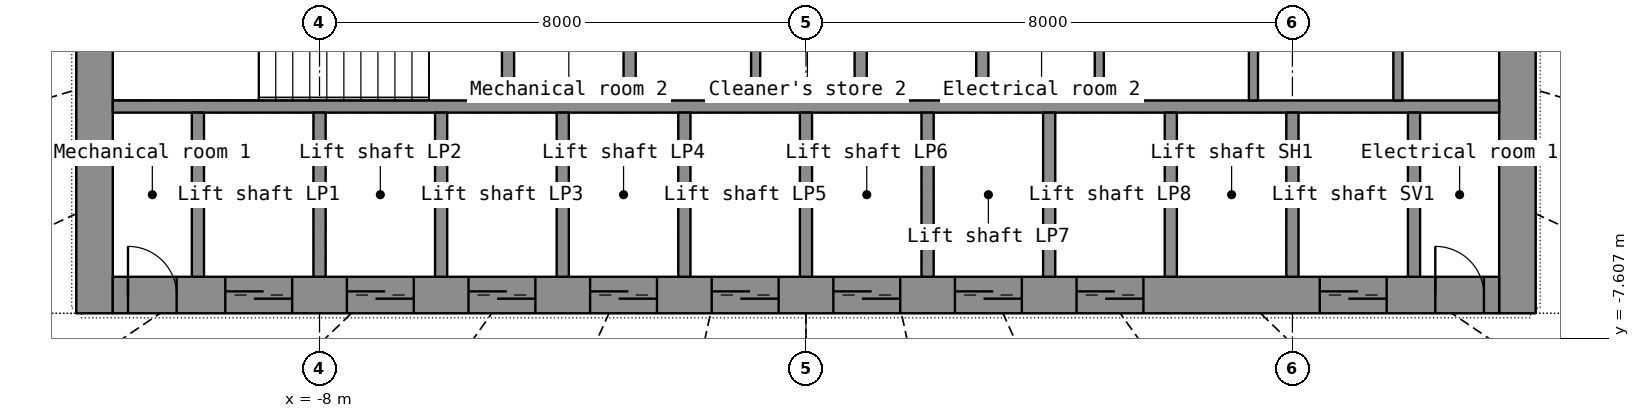
"""IFC4 building model, lengths in metres.
Left out: names, types, materials, properties, quantities, classifications, styles, units other than length and angle.
Written with IfcOpenShell. Run it as: python <this file> out.ifc"""

import sys

from ifc_helpers import new_model, si_unit, direction, frame, frame_2d, origin, place, context, subcontext, project, spatial, rectangle, extrude, element, fill, save


model = new_model("IFC4")
c1 = context("Model", 3, precision=1e-05, world=origin(), true_north=direction((0.0, 1.0)))
c2 = subcontext(c1, "Body", "Model", "MODEL_VIEW")
j1 = project(units=[si_unit("LENGTHUNIT", "METRE"), si_unit("PLANEANGLEUNIT", "RADIAN")], contexts=[c1])
p1 = place(None, origin())
s1 = spatial("IfcSite", under=j1, at=p1, CompositionType="ELEMENT")
p2 = place(p1, origin())
s2 = spatial("IfcBuilding", under=s1, at=p2, CompositionType="ELEMENT")
p3 = place(p2, frame((0.0, 0.0, 81.5)))
s3 = spatial("IfcBuildingStorey", under=s2, at=p3, CompositionType="ELEMENT", Elevation=81.5)
p4 = place(p3, frame((-11.7, -7.2, 0.0), z_axis=(0.0, 0.0, 1.0), x_axis=(0.0, 1.0, 0.0)))
e1 = element("IfcWall", 1, at=p4, inside=s3, PredefinedType="SHEAR", context=c2, shape_type="SweptSolid", body=[
    extrude(rectangle(XDim=14.4, YDim=0.6, at=frame_2d((7.2, 0.0))), origin(), (0.0, 0.0, 1.0), 3.3),
])
p5 = place(p4, frame((6.5, 0.0, 0.0)))
e2 = element("IfcOpeningElement", 2, at=p5, cuts=e1, PredefinedType="OPENING", context=c2, shape_type="SweptSolid", body=[
    extrude(rectangle(XDim=1.4, YDim=2.2, at=frame_2d((0.7, 1.1))), frame((0.0, 0.31, 0.0), z_axis=(0.0, -1.0, 0.0), x_axis=(1.0, 0.0, 0.0)), (0.0, 0.0, 1.0), 0.62),
])
p6 = place(p3, frame((11.7, -7.2, 0.0), z_axis=(0.0, 0.0, 1.0), x_axis=(0.0, 1.0, 0.0)))
e3 = element("IfcWall", 3, at=p6, inside=s3, PredefinedType="SHEAR", context=c2, shape_type="SweptSolid", body=[
    extrude(rectangle(XDim=14.4, YDim=0.6, at=frame_2d((7.2, 0.0))), origin(), (0.0, 0.0, 1.0), 3.3),
])
p7 = place(p6, frame((6.5, 0.0, 0.0)))
e4 = element("IfcOpeningElement", 4, at=p7, cuts=e3, PredefinedType="OPENING", context=c2, shape_type="SweptSolid", body=[
    extrude(rectangle(XDim=1.4, YDim=2.2, at=frame_2d((0.7, 1.1))), frame((0.0, 0.31, 0.0), z_axis=(0.0, -1.0, 0.0), x_axis=(1.0, 0.0, 0.0)), (0.0, 0.0, 1.0), 0.62),
])
p8 = place(p3, frame((-11.4, -6.9, 0.0), z_axis=(0.0, 0.0, 1.0), x_axis=(1.0, 0.0, 0.0)))
e5 = element("IfcWall", 5, at=p8, inside=s3, PredefinedType="SHEAR", context=c2, shape_type="SweptSolid", body=[
    extrude(rectangle(XDim=22.8, YDim=0.6, at=frame_2d((11.4, 0.0))), origin(), (0.0, 0.0, 1.0), 3.3),
])
p9 = place(p8, frame((1.85, 0.0, 0.0)))
e6 = element("IfcOpeningElement", 6, at=p9, cuts=e5, PredefinedType="OPENING", context=c2, shape_type="SweptSolid", body=[
    extrude(rectangle(XDim=1.1, YDim=2.2, at=frame_2d((0.55, 1.1))), frame((0.0, 0.31, 0.0), z_axis=(0.0, -1.0, 0.0), x_axis=(1.0, 0.0, 0.0)), (0.0, 0.0, 1.0), 0.62),
])
p10 = place(p8, frame((3.85, 0.0, 0.0)))
e7 = element("IfcOpeningElement", 7, at=p10, cuts=e5, PredefinedType="OPENING", context=c2, shape_type="SweptSolid", body=[
    extrude(rectangle(XDim=1.1, YDim=2.2, at=frame_2d((0.55, 1.1))), frame((0.0, 0.31, 0.0), z_axis=(0.0, -1.0, 0.0), x_axis=(1.0, 0.0, 0.0)), (0.0, 0.0, 1.0), 0.62),
])
p11 = place(p8, frame((5.85, 0.0, 0.0)))
e8 = element("IfcOpeningElement", 8, at=p11, cuts=e5, PredefinedType="OPENING", context=c2, shape_type="SweptSolid", body=[
    extrude(rectangle(XDim=1.1, YDim=2.2, at=frame_2d((0.55, 1.1))), frame((0.0, 0.31, 0.0), z_axis=(0.0, -1.0, 0.0), x_axis=(1.0, 0.0, 0.0)), (0.0, 0.0, 1.0), 0.62),
])
p12 = place(p8, frame((7.85, 0.0, 0.0)))
e9 = element("IfcOpeningElement", 9, at=p12, cuts=e5, PredefinedType="OPENING", context=c2, shape_type="SweptSolid", body=[
    extrude(rectangle(XDim=1.1, YDim=2.2, at=frame_2d((0.55, 1.1))), frame((0.0, 0.31, 0.0), z_axis=(0.0, -1.0, 0.0), x_axis=(1.0, 0.0, 0.0)), (0.0, 0.0, 1.0), 0.62),
])
p13 = place(p8, frame((9.85, 0.0, 0.0)))
e10 = element("IfcOpeningElement", 10, at=p13, cuts=e5, PredefinedType="OPENING", context=c2, shape_type="SweptSolid", body=[
    extrude(rectangle(XDim=1.1, YDim=2.2, at=frame_2d((0.55, 1.1))), frame((0.0, 0.31, 0.0), z_axis=(0.0, -1.0, 0.0), x_axis=(1.0, 0.0, 0.0)), (0.0, 0.0, 1.0), 0.62),
])
p14 = place(p8, frame((11.85, 0.0, 0.0)))
e11 = element("IfcOpeningElement", 11, at=p14, cuts=e5, PredefinedType="OPENING", context=c2, shape_type="SweptSolid", body=[
    extrude(rectangle(XDim=1.1, YDim=2.2, at=frame_2d((0.55, 1.1))), frame((0.0, 0.31, 0.0), z_axis=(0.0, -1.0, 0.0), x_axis=(1.0, 0.0, 0.0)), (0.0, 0.0, 1.0), 0.62),
])
p15 = place(p8, frame((13.85, 0.0, 0.0)))
e12 = element("IfcOpeningElement", 12, at=p15, cuts=e5, PredefinedType="OPENING", context=c2, shape_type="SweptSolid", body=[
    extrude(rectangle(XDim=1.1, YDim=2.2, at=frame_2d((0.55, 1.1))), frame((0.0, 0.31, 0.0), z_axis=(0.0, -1.0, 0.0), x_axis=(1.0, 0.0, 0.0)), (0.0, 0.0, 1.0), 0.62),
])
p16 = place(p8, frame((15.85, 0.0, 0.0)))
e13 = element("IfcOpeningElement", 13, at=p16, cuts=e5, PredefinedType="OPENING", context=c2, shape_type="SweptSolid", body=[
    extrude(rectangle(XDim=1.1, YDim=2.2, at=frame_2d((0.55, 1.1))), frame((0.0, 0.31, 0.0), z_axis=(0.0, -1.0, 0.0), x_axis=(1.0, 0.0, 0.0)), (0.0, 0.0, 1.0), 0.62),
])
p17 = place(p8, frame((19.85, 0.0, 0.0)))
e14 = element("IfcOpeningElement", 14, at=p17, cuts=e5, PredefinedType="OPENING", context=c2, shape_type="SweptSolid", body=[
    extrude(rectangle(XDim=1.1, YDim=2.2, at=frame_2d((0.55, 1.1))), frame((0.0, 0.31, 0.0), z_axis=(0.0, -1.0, 0.0), x_axis=(1.0, 0.0, 0.0)), (0.0, 0.0, 1.0), 0.62),
])
p18 = place(p8, frame((0.25, 0.0, 0.0)))
e15 = element("IfcOpeningElement", 15, at=p18, cuts=e5, PredefinedType="OPENING", context=c2, shape_type="SweptSolid", body=[
    extrude(rectangle(XDim=0.8, YDim=2.05, at=frame_2d((0.4, 1.025))), frame((0.0, 0.31, 0.0), z_axis=(0.0, -1.0, 0.0), x_axis=(1.0, 0.0, 0.0)), (0.0, 0.0, 1.0), 0.62),
])
p19 = place(p8, frame((21.75, 0.0, 0.0)))
e16 = element("IfcOpeningElement", 16, at=p19, cuts=e5, PredefinedType="OPENING", context=c2, shape_type="SweptSolid", body=[
    extrude(rectangle(XDim=0.8, YDim=2.05, at=frame_2d((0.4, 1.025))), frame((0.0, 0.31, 0.0), z_axis=(0.0, -1.0, 0.0), x_axis=(1.0, 0.0, 0.0)), (0.0, 0.0, 1.0), 0.62),
])
p20 = place(p3, frame((-11.4, -3.8, 0.0), z_axis=(0.0, 0.0, 1.0), x_axis=(1.0, 0.0, 0.0)))
e17 = element("IfcWall", 17, at=p20, inside=s3, PredefinedType="SHEAR", context=c2, shape_type="SweptSolid", body=[
    extrude(rectangle(XDim=22.8, YDim=0.2, at=frame_2d((11.4, 0.0))), origin(), (0.0, 0.0, 1.0), 3.3),
])
for number, where, z_axis, x_axis in (
    (18, (-10.0, -6.6, 0.0), (0.0, 0.0, 1.0), (0.0, 1.0, 0.0)),
    (19, (-8.0, -6.6, 0.0), (0.0, 0.0, 1.0), (0.0, 1.0, 0.0)),
    (20, (-6.0, -6.6, 0.0), (0.0, 0.0, 1.0), (0.0, 1.0, 0.0)),
    (21, (-4.0, -6.6, 0.0), (0.0, 0.0, 1.0), (0.0, 1.0, 0.0)),
    (22, (-2.0, -6.6, 0.0), (0.0, 0.0, 1.0), (0.0, 1.0, 0.0)),
    (23, (0.0, -6.6, 0.0), (0.0, 0.0, 1.0), (0.0, 1.0, 0.0)),
    (24, (2.0, -6.6, 0.0), (0.0, 0.0, 1.0), (0.0, 1.0, 0.0)),
    (25, (4.0, -6.6, 0.0), (0.0, 0.0, 1.0), (0.0, 1.0, 0.0)),
    (26, (6.0, -6.6, 0.0), (0.0, 0.0, 1.0), (0.0, 1.0, 0.0)),
    (27, (8.0, -6.6, 0.0), (0.0, 0.0, 1.0), (0.0, 1.0, 0.0)),
    (28, (10.0, -6.6, 0.0), (0.0, 0.0, 1.0), (0.0, 1.0, 0.0)),
):
    element("IfcWall", number, at=place(p3, frame(where, z_axis=z_axis, x_axis=x_axis)), inside=s3, PredefinedType="SHEAR", context=c2, shape_type="SweptSolid", body=[
        extrude(rectangle(XDim=2.7, YDim=0.2, at=frame_2d((1.35, 0.0))), origin(), (0.0, 0.0, 1.0), 3.3),
    ])
p21 = place(p3, frame((-2.9, -3.7, 0.0), z_axis=(0.0, 0.0, 1.0), x_axis=(0.0, 1.0, 0.0)))
e29 = element("IfcWall", 29, at=p21, inside=s3, PredefinedType="SHEAR", context=c2, shape_type="SweptSolid", body=[
    extrude(rectangle(XDim=7.4, YDim=0.2, at=frame_2d((3.7, 0.0))), origin(), (0.0, 0.0, 1.0), 3.3),
])
p22 = place(p21, frame((3.1, 0.0, 0.0)))
e30 = element("IfcOpeningElement", 30, at=p22, cuts=e29, PredefinedType="OPENING", context=c2, shape_type="SweptSolid", body=[
    extrude(rectangle(XDim=1.2, YDim=2.2, at=frame_2d((0.6, 1.1))), frame((0.0, 0.11, 0.0), z_axis=(0.0, -1.0, 0.0), x_axis=(1.0, 0.0, 0.0)), (0.0, 0.0, 1.0), 0.22),
])
p23 = place(p3, frame((2.9, -3.7, 0.0), z_axis=(0.0, 0.0, 1.0), x_axis=(0.0, 1.0, 0.0)))
e31 = element("IfcWall", 31, at=p23, inside=s3, PredefinedType="SHEAR", context=c2, shape_type="SweptSolid", body=[
    extrude(rectangle(XDim=7.4, YDim=0.2, at=frame_2d((3.7, 0.0))), origin(), (0.0, 0.0, 1.0), 3.3),
])
p24 = place(p23, frame((3.1, 0.0, 0.0)))
e32 = element("IfcOpeningElement", 32, at=p24, cuts=e31, PredefinedType="OPENING", context=c2, shape_type="SweptSolid", body=[
    extrude(rectangle(XDim=1.2, YDim=2.2, at=frame_2d((0.6, 1.1))), frame((0.0, 0.11, 0.0), z_axis=(0.0, -1.0, 0.0), x_axis=(1.0, 0.0, 0.0)), (0.0, 0.0, 1.0), 0.22),
])
for number, where, z_axis, x_axis in (
    (33, (0.9, -3.7, 0.0), (0.0, 0.0, 1.0), (0.0, 1.0, 0.0)),
    (34, (-4.9, -3.7, 0.0), (0.0, 0.0, 1.0), (0.0, 1.0, 0.0)),
):
    element("IfcWall", number, at=place(p3, frame(where, z_axis=z_axis, x_axis=x_axis)), inside=s3, PredefinedType="SHEAR", context=c2, shape_type="SweptSolid", body=[
        extrude(rectangle(XDim=2.35, YDim=0.2, at=frame_2d((1.175, 0.0))), origin(), (0.0, 0.0, 1.0), 3.3),
    ])
for number, where, z_axis, x_axis in (
    (35, (4.824, -3.7, 0.0), (0.0, 0.0, 1.0), (0.0, 1.0, 0.0)),
    (36, (7.359, -3.7, 0.0), (0.0, 0.0, 1.0), (0.0, 1.0, 0.0)),
    (37, (9.735, -3.7, 0.0), (0.0, 0.0, 1.0), (0.0, 1.0, 0.0)),
    (38, (-0.827, -3.7, 0.0), (0.0, 0.0, 1.0), (0.0, 1.0, 0.0)),
):
    element("IfcWall", number, at=place(p3, frame(where, z_axis=z_axis, x_axis=x_axis)), inside=s3, PredefinedType="PARTITIONING", context=c2, shape_type="SweptSolid", body=[
        extrude(rectangle(XDim=2.35, YDim=0.15, at=frame_2d((1.175, 0.0))), origin(), (0.0, 0.0, 1.0), 3.3),
    ])
p25 = place(p9, origin())
e39 = element("IfcDoor", 39, at=p25, inside=s3, OperationType="DOUBLE_DOOR_SLIDING", PredefinedType="DOOR", context=c2, shape_type="SweptSolid", body=[
    extrude(rectangle(XDim=1.1, YDim=2.2, at=frame_2d((0.55, 1.1))), frame((0.0, 0.025, 0.0), z_axis=(0.0, -1.0, 0.0), x_axis=(1.0, 0.0, 0.0)), (0.0, 0.0, 1.0), 0.05),
])
fill(e6, e39)
p26 = place(p10, origin())
e40 = element("IfcDoor", 40, at=p26, inside=s3, OperationType="DOUBLE_DOOR_SLIDING", PredefinedType="DOOR", context=c2, shape_type="SweptSolid", body=[
    extrude(rectangle(XDim=1.1, YDim=2.2, at=frame_2d((0.55, 1.1))), frame((0.0, 0.025, 0.0), z_axis=(0.0, -1.0, 0.0), x_axis=(1.0, 0.0, 0.0)), (0.0, 0.0, 1.0), 0.05),
])
fill(e7, e40)
p27 = place(p11, origin())
e41 = element("IfcDoor", 41, at=p27, inside=s3, OperationType="DOUBLE_DOOR_SLIDING", PredefinedType="DOOR", context=c2, shape_type="SweptSolid", body=[
    extrude(rectangle(XDim=1.1, YDim=2.2, at=frame_2d((0.55, 1.1))), frame((0.0, 0.025, 0.0), z_axis=(0.0, -1.0, 0.0), x_axis=(1.0, 0.0, 0.0)), (0.0, 0.0, 1.0), 0.05),
])
fill(e8, e41)
p28 = place(p12, origin())
e42 = element("IfcDoor", 42, at=p28, inside=s3, OperationType="DOUBLE_DOOR_SLIDING", PredefinedType="DOOR", context=c2, shape_type="SweptSolid", body=[
    extrude(rectangle(XDim=1.1, YDim=2.2, at=frame_2d((0.55, 1.1))), frame((0.0, 0.025, 0.0), z_axis=(0.0, -1.0, 0.0), x_axis=(1.0, 0.0, 0.0)), (0.0, 0.0, 1.0), 0.05),
])
fill(e9, e42)
p29 = place(p13, origin())
e43 = element("IfcDoor", 43, at=p29, inside=s3, OperationType="DOUBLE_DOOR_SLIDING", PredefinedType="DOOR", context=c2, shape_type="SweptSolid", body=[
    extrude(rectangle(XDim=1.1, YDim=2.2, at=frame_2d((0.55, 1.1))), frame((0.0, 0.025, 0.0), z_axis=(0.0, -1.0, 0.0), x_axis=(1.0, 0.0, 0.0)), (0.0, 0.0, 1.0), 0.05),
])
fill(e10, e43)
p30 = place(p14, origin())
e44 = element("IfcDoor", 44, at=p30, inside=s3, OperationType="DOUBLE_DOOR_SLIDING", PredefinedType="DOOR", context=c2, shape_type="SweptSolid", body=[
    extrude(rectangle(XDim=1.1, YDim=2.2, at=frame_2d((0.55, 1.1))), frame((0.0, 0.025, 0.0), z_axis=(0.0, -1.0, 0.0), x_axis=(1.0, 0.0, 0.0)), (0.0, 0.0, 1.0), 0.05),
])
fill(e11, e44)
p31 = place(p15, origin())
e45 = element("IfcDoor", 45, at=p31, inside=s3, OperationType="DOUBLE_DOOR_SLIDING", PredefinedType="DOOR", context=c2, shape_type="SweptSolid", body=[
    extrude(rectangle(XDim=1.1, YDim=2.2, at=frame_2d((0.55, 1.1))), frame((0.0, 0.025, 0.0), z_axis=(0.0, -1.0, 0.0), x_axis=(1.0, 0.0, 0.0)), (0.0, 0.0, 1.0), 0.05),
])
fill(e12, e45)
p32 = place(p16, origin())
e46 = element("IfcDoor", 46, at=p32, inside=s3, OperationType="DOUBLE_DOOR_SLIDING", PredefinedType="DOOR", context=c2, shape_type="SweptSolid", body=[
    extrude(rectangle(XDim=1.1, YDim=2.2, at=frame_2d((0.55, 1.1))), frame((0.0, 0.025, 0.0), z_axis=(0.0, -1.0, 0.0), x_axis=(1.0, 0.0, 0.0)), (0.0, 0.0, 1.0), 0.05),
])
fill(e13, e46)
p33 = place(p17, origin())
e47 = element("IfcDoor", 47, at=p33, inside=s3, OperationType="DOUBLE_DOOR_SLIDING", PredefinedType="DOOR", context=c2, shape_type="SweptSolid", body=[
    extrude(rectangle(XDim=1.1, YDim=2.2, at=frame_2d((0.55, 1.1))), frame((0.0, 0.025, 0.0), z_axis=(0.0, -1.0, 0.0), x_axis=(1.0, 0.0, 0.0)), (0.0, 0.0, 1.0), 0.05),
])
fill(e14, e47)
p34 = place(p18, origin())
e48 = element("IfcDoor", 48, at=p34, inside=s3, OperationType="SINGLE_SWING_LEFT", PredefinedType="DOOR", context=c2, shape_type="SweptSolid", body=[
    extrude(rectangle(XDim=0.8, YDim=2.05, at=frame_2d((0.4, 1.025))), frame((0.0, 0.025, 0.0), z_axis=(0.0, -1.0, 0.0), x_axis=(1.0, 0.0, 0.0)), (0.0, 0.0, 1.0), 0.05),
])
fill(e15, e48)
p35 = place(p19, origin())
e49 = element("IfcDoor", 49, at=p35, inside=s3, OperationType="SINGLE_SWING_LEFT", PredefinedType="DOOR", context=c2, shape_type="SweptSolid", body=[
    extrude(rectangle(XDim=0.8, YDim=2.05, at=frame_2d((0.4, 1.025))), frame((0.0, 0.025, 0.0), z_axis=(0.0, -1.0, 0.0), x_axis=(1.0, 0.0, 0.0)), (0.0, 0.0, 1.0), 0.05),
])
fill(e16, e49)
save(model, sys.argv[1])
